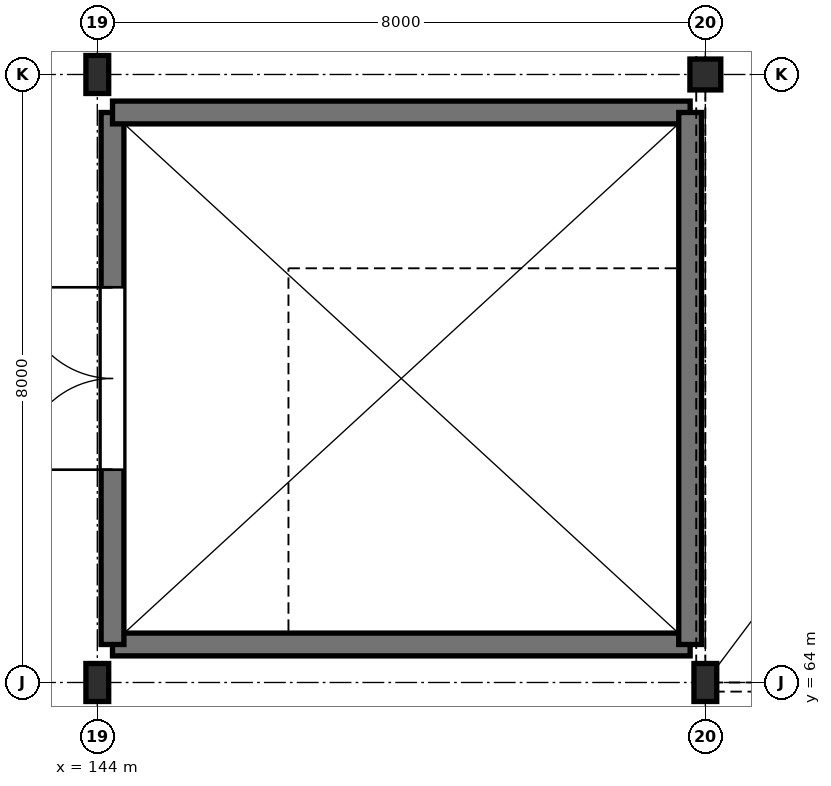
"""IFC4 building model, lengths in metres.
Left out: names, types, materials, properties, quantities, classifications, styles, units other than length and angle.
Written with IfcOpenShell. Run it as: python <this file> out.ifc"""

import sys

from ifc_helpers import new_model, si_unit, direction, frame, frame_2d, origin, origin_2d, place, context, subcontext, project, spatial, rectangle, hollow_circle, i_section, extrude, element, fill, save


model = new_model("IFC4")
c1 = context("Model", 3, precision=1e-05, world=origin(), true_north=direction((0.0, 1.0)))
c2 = subcontext(c1, "Body", "Model", "MODEL_VIEW")
j1 = project(units=[si_unit("LENGTHUNIT", "METRE"), si_unit("PLANEANGLEUNIT", "RADIAN")], contexts=[c1])
p1 = place(None, origin())
s1 = spatial("IfcSite", under=j1, at=p1, CompositionType="ELEMENT")
p2 = place(p1, origin())
s2 = spatial("IfcBuilding", under=s1, at=p2, CompositionType="ELEMENT")
p3 = place(p2, frame((0.0, 0.0, 10.2)))
s3 = spatial("IfcBuildingStorey", under=s2, at=p3, CompositionType="ELEMENT", Elevation=10.2)
for number, where, z_axis, x_axis in (
    (1, (144.0, 64.0, 0.0), (0.0, 0.0, 1.0), (1.0, 0.0, 0.0)),
    (2, (144.0, 72.0, 0.0), (0.0, 0.0, 1.0), (1.0, 0.0, 0.0)),
    (3, (152.0, 64.0, 0.0), (0.0, 0.0, 1.0), (1.0, 0.0, 0.0)),
):
    element("IfcColumn", number, at=place(p3, frame(where, z_axis=z_axis, x_axis=x_axis)), inside=s3, PredefinedType="COLUMN", context=c2, shape_type="SweptSolid", body=[
        extrude(i_section(OverallWidth=0.3, OverallDepth=0.5, WebThickness=0.014, FlangeThickness=0.028, FilletRadius=0.027, at=origin_2d()), origin(), (0.0, 0.0, 1.0), 4.8),
    ])
p4 = place(p3, frame((152.0, 72.0, 0.0), z_axis=(0.0, 0.0, 1.0), x_axis=(1.0, 0.0, 0.0)))
e4 = element("IfcColumn", 4, at=p4, inside=s3, PredefinedType="COLUMN", context=c2, shape_type="SweptSolid", body=[
    extrude(hollow_circle(Radius=0.203, WallThickness=0.02, at=origin_2d()), origin(), (0.0, 0.0, 1.0), 4.8),
])
p5 = place(p3, frame((151.8, 64.5, 0.0), z_axis=(0.0, 0.0, 1.0), x_axis=(-1.0, 0.0, 0.0)))
e5 = element("IfcWall", 5, at=p5, inside=s3, PredefinedType="SHEAR", context=c2, shape_type="SweptSolid", body=[
    extrude(rectangle(XDim=7.6, YDim=0.3, at=frame_2d((3.8, 0.0))), origin(), (0.0, 0.0, 1.0), 4.46),
])
p6 = place(p3, frame((144.2, 64.5, 0.0), z_axis=(0.0, 0.0, 1.0), x_axis=(0.0, 1.0, 0.0)))
e6 = element("IfcWall", 6, at=p6, inside=s3, PredefinedType="SHEAR", context=c2, shape_type="SweptSolid", body=[
    extrude(rectangle(XDim=7.0, YDim=0.3, at=frame_2d((3.5, 0.0))), origin(), (0.0, 0.0, 1.0), 4.46),
])
p7 = place(p6, frame((2.3, 0.0, 0.0)))
e7 = element("IfcOpeningElement", 7, at=p7, cuts=e6, PredefinedType="OPENING", context=c2, shape_type="SweptSolid", body=[
    extrude(rectangle(XDim=2.4, YDim=2.2, at=frame_2d((1.2, 1.1))), frame((0.0, 0.16, 0.0), z_axis=(0.0, -1.0, 0.0), x_axis=(1.0, 0.0, 0.0)), (0.0, 0.0, 1.0), 0.32),
])
p8 = place(p3, frame((144.2, 71.5, 0.0), z_axis=(0.0, 0.0, 1.0), x_axis=(1.0, 0.0, 0.0)))
e8 = element("IfcWall", 8, at=p8, inside=s3, PredefinedType="SHEAR", context=c2, shape_type="SweptSolid", body=[
    extrude(rectangle(XDim=7.6, YDim=0.3, at=frame_2d((3.8, 0.0))), origin(), (0.0, 0.0, 1.0), 4.46),
])
p9 = place(p3, frame((151.8, 71.5, 0.0), z_axis=(0.0, 0.0, 1.0), x_axis=(0.0, -1.0, 0.0)))
e9 = element("IfcWall", 9, at=p9, inside=s3, PredefinedType="SHEAR", context=c2, shape_type="SweptSolid", body=[
    extrude(rectangle(XDim=7.0, YDim=0.3, at=frame_2d((3.5, 0.0))), origin(), (0.0, 0.0, 1.0), 4.46),
])
p10 = place(p7, frame((2.4, 0.0, 0.0), z_axis=(0.0, 0.0, 1.0), x_axis=(-1.0, 0.0, 0.0)))
e10 = element("IfcDoor", 10, at=p10, inside=s3, OperationType="DOUBLE_DOOR_SINGLE_SWING", PredefinedType="DOOR", context=c2, shape_type="SweptSolid", body=[
    extrude(rectangle(XDim=2.4, YDim=2.2, at=frame_2d((1.2, 1.1))), frame((0.0, 0.025, 0.0), z_axis=(0.0, -1.0, 0.0), x_axis=(1.0, 0.0, 0.0)), (0.0, 0.0, 1.0), 0.05),
])
fill(e7, e10)
save(model, sys.argv[1])
